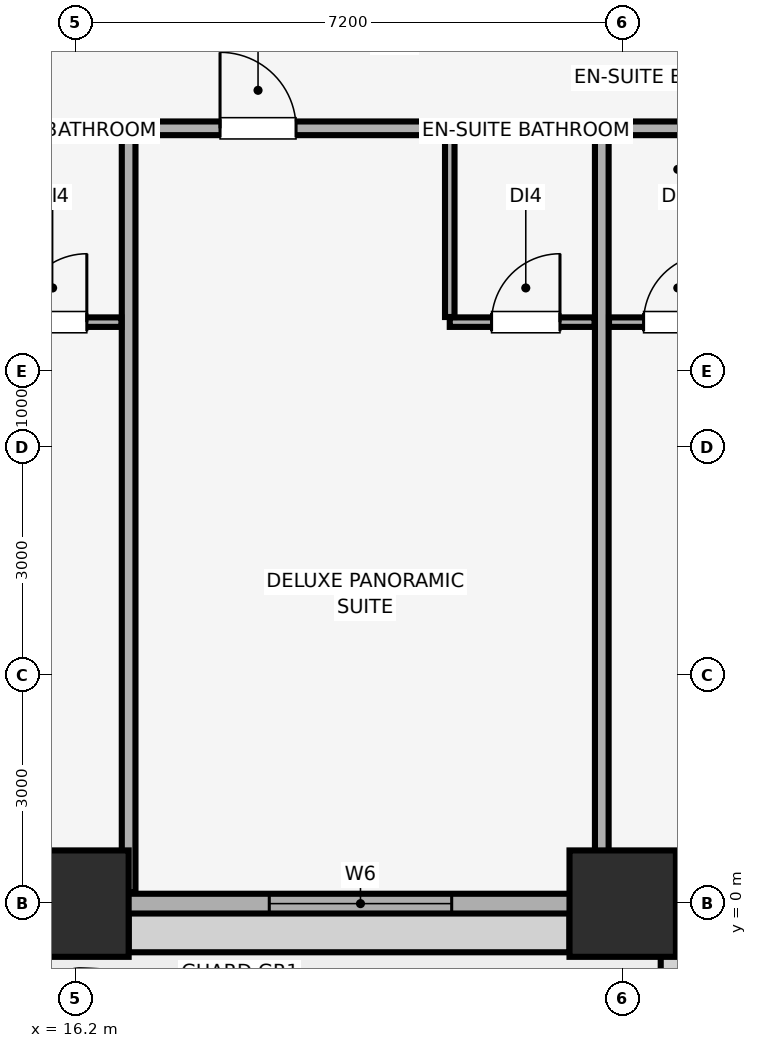
"""IFC4 building model, lengths in metres.
Left out: names, types, materials, properties, quantities, classifications, styles, units other than length and angle.
Written with IfcOpenShell. Run it as: python <this file> out.ifc"""

import sys

from ifc_helpers import new_model, si_unit, direction, frame, frame_2d, origin, origin_2d, place, context, subcontext, project, spatial, rectangle, extrude, element, fill, save


model = new_model("IFC4")
c1 = context("Model", 3, precision=1e-05, world=origin(), true_north=direction((0.0, 1.0)))
c2 = subcontext(c1, "Body", "Model", "MODEL_VIEW")
j1 = project(units=[si_unit("LENGTHUNIT", "METRE"), si_unit("PLANEANGLEUNIT", "RADIAN")], contexts=[c1])
p1 = place(None, origin())
s1 = spatial("IfcSite", under=j1, at=p1, CompositionType="ELEMENT")
p2 = place(p1, origin())
s2 = spatial("IfcBuilding", under=s1, at=p2, CompositionType="ELEMENT")
p3 = place(p2, frame((0.0, 0.0, 46.4)))
s3 = spatial("IfcBuildingStorey", under=s2, at=p3, CompositionType="ELEMENT", Elevation=46.4)
for number, where, z_axis, x_axis in (
    (1, (16.2, 0.0, 0.0), (0.0, 0.0, 1.0), (1.0, 0.0, 0.0)),
    (2, (23.4, 0.0, 0.0), (0.0, 0.0, 1.0), (1.0, 0.0, 0.0)),
):
    element("IfcColumn", number, at=place(p3, frame(where, z_axis=z_axis, x_axis=x_axis)), inside=s3, PredefinedType="COLUMN", context=c2, shape_type="SweptSolid", body=[
        extrude(rectangle(XDim=1.4, YDim=1.4, at=origin_2d()), origin(), (0.0, 0.0, 1.0), 3.51),
    ])
p4 = place(p3, frame((4.2, 0.0, 0.0), z_axis=(0.0, 0.0, 1.0), x_axis=(1.0, 0.0, 0.0)))
e3 = element("IfcWall", 3, at=p4, inside=s3, PredefinedType="SOLIDWALL", context=c2, shape_type="SweptSolid", body=[
    extrude(rectangle(XDim=75.6, YDim=0.26, at=frame_2d((37.8, 0.0))), origin(), (0.0, 0.0, 1.0), 2.56),
])
p5 = place(p4, frame((22.948, 0.0, 0.0)))
e4 = element("IfcOpeningElement", 4, at=p5, cuts=e3, PredefinedType="OPENING", context=c2, shape_type="SweptSolid", body=[
    extrude(rectangle(XDim=1.1, YDim=2.15, at=frame_2d((0.55, 1.075))), frame((0.0, 0.14, 0.0), z_axis=(0.0, -1.0, 0.0), x_axis=(1.0, 0.0, 0.0)), (0.0, 0.0, 1.0), 0.28),
])
p6 = place(p4, frame((44.61, 0.0, 0.0)))
e5 = element("IfcOpeningElement", 5, at=p6, cuts=e3, PredefinedType="OPENING", context=c2, shape_type="SweptSolid", body=[
    extrude(rectangle(XDim=1.1, YDim=2.15, at=frame_2d((0.55, 1.075))), frame((0.0, 0.14, 0.0), z_axis=(0.0, -1.0, 0.0), x_axis=(1.0, 0.0, 0.0)), (0.0, 0.0, 1.0), 0.28),
])
p7 = place(p4, frame((66.272, 0.0, 0.0)))
e6 = element("IfcOpeningElement", 6, at=p7, cuts=e3, PredefinedType="OPENING", context=c2, shape_type="SweptSolid", body=[
    extrude(rectangle(XDim=1.1, YDim=2.15, at=frame_2d((0.55, 1.075))), frame((0.0, 0.14, 0.0), z_axis=(0.0, -1.0, 0.0), x_axis=(1.0, 0.0, 0.0)), (0.0, 0.0, 1.0), 0.28),
])
p8 = place(p4, frame((1.035, 0.0, 0.85)))
e7 = element("IfcOpeningElement", 7, at=p8, cuts=e3, PredefinedType="OPENING", context=c2, shape_type="SweptSolid", body=[
    extrude(rectangle(XDim=2.4, YDim=1.5, at=frame_2d((1.2, 0.75))), frame((0.0, 0.14, 0.0), z_axis=(0.0, -1.0, 0.0), x_axis=(1.0, 0.0, 0.0)), (0.0, 0.0, 1.0), 0.28),
])
p9 = place(p4, frame((7.837, 0.0, 0.85)))
e8 = element("IfcOpeningElement", 8, at=p9, cuts=e3, PredefinedType="OPENING", context=c2, shape_type="SweptSolid", body=[
    extrude(rectangle(XDim=2.4, YDim=1.5, at=frame_2d((1.2, 0.75))), frame((0.0, 0.14, 0.0), z_axis=(0.0, -1.0, 0.0), x_axis=(1.0, 0.0, 0.0)), (0.0, 0.0, 1.0), 0.28),
])
p10 = place(p4, frame((14.55, 0.0, 0.85)))
e9 = element("IfcOpeningElement", 9, at=p10, cuts=e3, PredefinedType="OPENING", context=c2, shape_type="SweptSolid", body=[
    extrude(rectangle(XDim=2.4, YDim=1.5, at=frame_2d((1.2, 0.75))), frame((0.0, 0.14, 0.0), z_axis=(0.0, -1.0, 0.0), x_axis=(1.0, 0.0, 0.0)), (0.0, 0.0, 1.0), 0.28),
])
p11 = place(p4, frame((20.439, 0.0, 0.85)))
e10 = element("IfcOpeningElement", 10, at=p11, cuts=e3, PredefinedType="OPENING", context=c2, shape_type="SweptSolid", body=[
    extrude(rectangle(XDim=1.5, YDim=1.4, at=frame_2d((0.75, 0.7))), frame((0.0, 0.14, 0.0), z_axis=(0.0, -1.0, 0.0), x_axis=(1.0, 0.0, 0.0)), (0.0, 0.0, 1.0), 0.28),
])
p12 = place(p4, frame((27.887, 0.0, 0.85)))
e11 = element("IfcOpeningElement", 11, at=p12, cuts=e3, PredefinedType="OPENING", context=c2, shape_type="SweptSolid", body=[
    extrude(rectangle(XDim=2.4, YDim=1.5, at=frame_2d((1.2, 0.75))), frame((0.0, 0.14, 0.0), z_axis=(0.0, -1.0, 0.0), x_axis=(1.0, 0.0, 0.0)), (0.0, 0.0, 1.0), 0.28),
])
p13 = place(p4, frame((34.6, 0.0, 0.85)))
e12 = element("IfcOpeningElement", 12, at=p13, cuts=e3, PredefinedType="OPENING", context=c2, shape_type="SweptSolid", body=[
    extrude(rectangle(XDim=2.4, YDim=1.5, at=frame_2d((1.2, 0.75))), frame((0.0, 0.14, 0.0), z_axis=(0.0, -1.0, 0.0), x_axis=(1.0, 0.0, 0.0)), (0.0, 0.0, 1.0), 0.28),
])
p14 = place(p4, frame((38.399, 0.0, 0.85)))
e13 = element("IfcOpeningElement", 13, at=p14, cuts=e3, PredefinedType="OPENING", context=c2, shape_type="SweptSolid", body=[
    extrude(rectangle(XDim=2.4, YDim=1.5, at=frame_2d((1.2, 0.75))), frame((0.0, 0.14, 0.0), z_axis=(0.0, -1.0, 0.0), x_axis=(1.0, 0.0, 0.0)), (0.0, 0.0, 1.0), 0.28),
])
p15 = place(p4, frame((46.59, 0.0, 0.85)))
e14 = element("IfcOpeningElement", 14, at=p15, cuts=e3, PredefinedType="OPENING", context=c2, shape_type="SweptSolid", body=[
    extrude(rectangle(XDim=1.5, YDim=1.4, at=frame_2d((0.75, 0.7))), frame((0.0, 0.14, 0.0), z_axis=(0.0, -1.0, 0.0), x_axis=(1.0, 0.0, 0.0)), (0.0, 0.0, 1.0), 0.28),
])
p16 = place(p4, frame((51.824, 0.0, 0.85)))
e15 = element("IfcOpeningElement", 15, at=p16, cuts=e3, PredefinedType="OPENING", context=c2, shape_type="SweptSolid", body=[
    extrude(rectangle(XDim=2.4, YDim=1.5, at=frame_2d((1.2, 0.75))), frame((0.0, 0.14, 0.0), z_axis=(0.0, -1.0, 0.0), x_axis=(1.0, 0.0, 0.0)), (0.0, 0.0, 1.0), 0.28),
])
p17 = place(p4, frame((58.449, 0.0, 0.85)))
e16 = element("IfcOpeningElement", 16, at=p17, cuts=e3, PredefinedType="OPENING", context=c2, shape_type="SweptSolid", body=[
    extrude(rectangle(XDim=2.4, YDim=1.5, at=frame_2d((1.2, 0.75))), frame((0.0, 0.14, 0.0), z_axis=(0.0, -1.0, 0.0), x_axis=(1.0, 0.0, 0.0)), (0.0, 0.0, 1.0), 0.28),
])
p18 = place(p4, frame((72.165, 0.0, 0.85)))
e17 = element("IfcOpeningElement", 17, at=p18, cuts=e3, PredefinedType="OPENING", context=c2, shape_type="SweptSolid", body=[
    extrude(rectangle(XDim=2.4, YDim=1.5, at=frame_2d((1.2, 0.75))), frame((0.0, 0.14, 0.0), z_axis=(0.0, -1.0, 0.0), x_axis=(1.0, 0.0, 0.0)), (0.0, 0.0, 1.0), 0.28),
])
p19 = place(p3, frame((10.77, 10.2, 0.0), z_axis=(0.0, 0.0, 1.0), x_axis=(1.0, 0.0, 0.0)))
e18 = element("IfcWall", 18, at=p19, inside=s3, PredefinedType="PARTITIONING", context=c2, shape_type="SweptSolid", body=[
    extrude(rectangle(XDim=6.13, YDim=0.18, at=frame_2d((3.065, 0.0))), origin(), (0.0, 0.0, 1.0), 3.51),
])
p20 = place(p19, frame((1.067, 0.0, 0.0)))
e19 = element("IfcOpeningElement", 19, at=p20, cuts=e18, PredefinedType="OPENING", context=c2, shape_type="SweptSolid", body=[
    extrude(rectangle(XDim=1.0, YDim=2.15, at=frame_2d((0.5, 1.075))), frame((0.0, 0.1, 0.0), z_axis=(0.0, -1.0, 0.0), x_axis=(1.0, 0.0, 0.0)), (0.0, 0.0, 1.0), 0.2),
])
p21 = place(p3, frame((16.9, 0.15, 0.0), z_axis=(0.0, 0.0, 1.0), x_axis=(0.0, 1.0, 0.0)))
e20 = element("IfcWall", 20, at=p21, inside=s3, PredefinedType="PARTITIONING", context=c2, shape_type="SweptSolid", body=[
    extrude(rectangle(XDim=9.955, YDim=0.18, at=frame_2d((4.978, 0.0))), origin(), (0.0, 0.0, 1.0), 3.51),
])
p22 = place(p3, frame((14.9, 7.65, 0.0), z_axis=(0.0, 0.0, 1.0), x_axis=(1.0, 0.0, 0.0)))
e21 = element("IfcWall", 21, at=p22, inside=s3, PredefinedType="PARTITIONING", context=c2, shape_type="SweptSolid", body=[
    extrude(rectangle(XDim=1.905, YDim=0.125, at=frame_2d((0.953, 0.0))), origin(), (0.0, 0.0, 1.0), 3.51),
])
p23 = place(p22, frame((0.55, 0.0, 0.0)))
e22 = element("IfcOpeningElement", 22, at=p23, cuts=e21, PredefinedType="OPENING", context=c2, shape_type="SweptSolid", body=[
    extrude(rectangle(XDim=0.9, YDim=2.1, at=frame_2d((0.45, 1.05))), frame((0.0, 0.073, 0.0), z_axis=(0.0, -1.0, 0.0), x_axis=(1.0, 0.0, 0.0)), (0.0, 0.0, 1.0), 0.145),
])
p24 = place(p3, frame((16.995, 10.2, 0.0), z_axis=(0.0, 0.0, 1.0), x_axis=(1.0, 0.0, 0.0)))
e23 = element("IfcWall", 23, at=p24, inside=s3, PredefinedType="PARTITIONING", context=c2, shape_type="SweptSolid", body=[
    extrude(rectangle(XDim=6.13, YDim=0.18, at=frame_2d((3.065, 0.0))), origin(), (0.0, 0.0, 1.0), 3.51),
])
p25 = place(p24, frame((1.108, 0.0, 0.0)))
e24 = element("IfcOpeningElement", 24, at=p25, cuts=e23, PredefinedType="OPENING", context=c2, shape_type="SweptSolid", body=[
    extrude(rectangle(XDim=1.0, YDim=2.15, at=frame_2d((0.5, 1.075))), frame((0.0, 0.1, 0.0), z_axis=(0.0, -1.0, 0.0), x_axis=(1.0, 0.0, 0.0)), (0.0, 0.0, 1.0), 0.2),
])
p26 = place(p3, frame((23.125, 0.15, 0.0), z_axis=(0.0, 0.0, 1.0), x_axis=(0.0, 1.0, 0.0)))
e25 = element("IfcWall", 25, at=p26, inside=s3, PredefinedType="PARTITIONING", context=c2, shape_type="SweptSolid", body=[
    extrude(rectangle(XDim=9.955, YDim=0.18, at=frame_2d((4.978, 0.0))), origin(), (0.0, 0.0, 1.0), 2.88),
])
p27 = place(p3, frame((21.125, 7.65, 0.0), z_axis=(0.0, 0.0, 1.0), x_axis=(1.0, 0.0, 0.0)))
e26 = element("IfcWall", 26, at=p27, inside=s3, PredefinedType="PARTITIONING", context=c2, shape_type="SweptSolid", body=[
    extrude(rectangle(XDim=1.905, YDim=0.125, at=frame_2d((0.953, 0.0))), origin(), (0.0, 0.0, 1.0), 3.51),
])
p28 = place(p27, frame((0.55, 0.0, 0.0)))
e27 = element("IfcOpeningElement", 27, at=p28, cuts=e26, PredefinedType="OPENING", context=c2, shape_type="SweptSolid", body=[
    extrude(rectangle(XDim=0.9, YDim=2.1, at=frame_2d((0.45, 1.05))), frame((0.0, 0.073, 0.0), z_axis=(0.0, -1.0, 0.0), x_axis=(1.0, 0.0, 0.0)), (0.0, 0.0, 1.0), 0.145),
])
p29 = place(p3, frame((21.125, 7.718, 0.0), z_axis=(0.0, 0.0, 1.0), x_axis=(0.0, 1.0, 0.0)))
e28 = element("IfcWall", 28, at=p29, inside=s3, PredefinedType="PARTITIONING", context=c2, shape_type="SweptSolid", body=[
    extrude(rectangle(XDim=2.387, YDim=0.125, at=frame_2d((1.194, 0.0))), origin(), (0.0, 0.0, 1.0), 3.51),
])
p30 = place(p3, frame((23.219, 10.2, 0.0), z_axis=(0.0, 0.0, 1.0), x_axis=(1.0, 0.0, 0.0)))
e29 = element("IfcWall", 29, at=p30, inside=s3, PredefinedType="PARTITIONING", context=c2, shape_type="SweptSolid", body=[
    extrude(rectangle(XDim=6.13, YDim=0.18, at=frame_2d((3.065, 0.0))), origin(), (0.0, 0.0, 1.0), 3.51),
])
p31 = place(p30, frame((3.967, 0.0, 0.0)))
e30 = element("IfcOpeningElement", 30, at=p31, cuts=e29, PredefinedType="OPENING", context=c2, shape_type="SweptSolid", body=[
    extrude(rectangle(XDim=1.0, YDim=2.15, at=frame_2d((0.5, 1.075))), frame((0.0, 0.1, 0.0), z_axis=(0.0, -1.0, 0.0), x_axis=(1.0, 0.0, 0.0)), (0.0, 0.0, 1.0), 0.2),
])
p32 = place(p3, frame((23.219, 7.65, 0.0), z_axis=(0.0, 0.0, 1.0), x_axis=(1.0, 0.0, 0.0)))
e31 = element("IfcWall", 31, at=p32, inside=s3, PredefinedType="PARTITIONING", context=c2, shape_type="SweptSolid", body=[
    extrude(rectangle(XDim=1.905, YDim=0.125, at=frame_2d((0.953, 0.0))), origin(), (0.0, 0.0, 1.0), 3.51),
])
p33 = place(p32, frame((0.455, 0.0, 0.0)))
e32 = element("IfcOpeningElement", 32, at=p33, cuts=e31, PredefinedType="OPENING", context=c2, shape_type="SweptSolid", body=[
    extrude(rectangle(XDim=0.9, YDim=2.1, at=frame_2d((0.45, 1.05))), frame((0.0, 0.073, 0.0), z_axis=(0.0, -1.0, 0.0), x_axis=(1.0, 0.0, 0.0)), (0.0, 0.0, 1.0), 0.145),
])
p34 = place(p10, origin())
e33 = element("IfcWindow", 33, at=p34, inside=s3, PartitioningType="SINGLE_PANEL", PredefinedType="WINDOW", context=c2, shape_type="SweptSolid", body=[
    extrude(rectangle(XDim=2.4, YDim=1.5, at=frame_2d((1.2, 0.75))), frame((0.0, 0.03, 0.0), z_axis=(0.0, -1.0, 0.0), x_axis=(1.0, 0.0, 0.0)), (0.0, 0.0, 1.0), 0.06),
])
fill(e9, e33)
p35 = place(p23, origin())
e34 = element("IfcDoor", 34, at=p35, inside=s3, OperationType="SINGLE_SWING_RIGHT", PredefinedType="DOOR", context=c2, shape_type="SweptSolid", body=[
    extrude(rectangle(XDim=0.9, YDim=2.1, at=frame_2d((0.45, 1.05))), frame((0.0, 0.025, 0.0), z_axis=(0.0, -1.0, 0.0), x_axis=(1.0, 0.0, 0.0)), (0.0, 0.0, 1.0), 0.05),
])
fill(e22, e34)
p36 = place(p25, origin())
e35 = element("IfcDoor", 35, at=p36, inside=s3, OperationType="SINGLE_SWING_LEFT", PredefinedType="DOOR", context=c2, shape_type="SweptSolid", body=[
    extrude(rectangle(XDim=1.0, YDim=2.15, at=frame_2d((0.5, 1.075))), frame((0.0, 0.025, 0.0), z_axis=(0.0, -1.0, 0.0), x_axis=(1.0, 0.0, 0.0)), (0.0, 0.0, 1.0), 0.05),
])
fill(e24, e35)
p37 = place(p28, origin())
e36 = element("IfcDoor", 36, at=p37, inside=s3, OperationType="SINGLE_SWING_RIGHT", PredefinedType="DOOR", context=c2, shape_type="SweptSolid", body=[
    extrude(rectangle(XDim=0.9, YDim=2.1, at=frame_2d((0.45, 1.05))), frame((0.0, 0.025, 0.0), z_axis=(0.0, -1.0, 0.0), x_axis=(1.0, 0.0, 0.0)), (0.0, 0.0, 1.0), 0.05),
])
fill(e27, e36)
p38 = place(p33, origin())
e37 = element("IfcDoor", 37, at=p38, inside=s3, OperationType="SINGLE_SWING_RIGHT", PredefinedType="DOOR", context=c2, shape_type="SweptSolid", body=[
    extrude(rectangle(XDim=0.9, YDim=2.1, at=frame_2d((0.45, 1.05))), frame((0.0, 0.025, 0.0), z_axis=(0.0, -1.0, 0.0), x_axis=(1.0, 0.0, 0.0)), (0.0, 0.0, 1.0), 0.05),
])
fill(e32, e37)
save(model, sys.argv[1])
